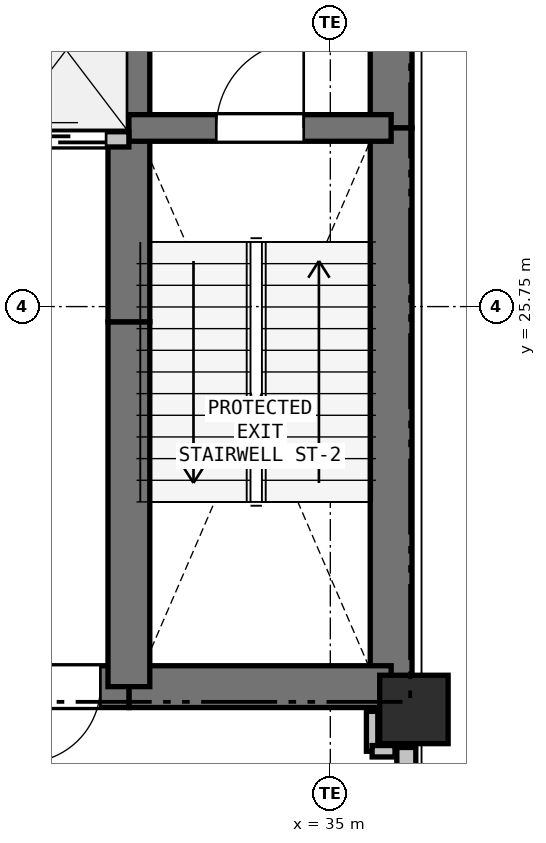
"""IFC4 building model, lengths in metres.
Left out: names, types, materials, properties, quantities, classifications, styles, units other than length and angle.
Written with IfcOpenShell. Run it as: python <this file> out.ifc"""

import sys

from ifc_helpers import new_model, si_unit, direction, frame, frame_2d, origin, origin_2d, place, context, subcontext, project, spatial, rectangle, extrude, element, fill, save


model = new_model("IFC4")
c1 = context("Model", 3, precision=1e-05, world=origin(), true_north=direction((0.0, 1.0)))
c2 = subcontext(c1, "Body", "Model", "MODEL_VIEW")
j1 = project(units=[si_unit("LENGTHUNIT", "METRE"), si_unit("PLANEANGLEUNIT", "RADIAN")], contexts=[c1])
p1 = place(None, origin())
s1 = spatial("IfcSite", under=j1, at=p1, CompositionType="ELEMENT")
p2 = place(p1, origin())
s2 = spatial("IfcBuilding", under=s1, at=p2, CompositionType="ELEMENT")
p3 = place(p2, frame((0.0, 0.0, 5.1)))
s3 = spatial("IfcBuildingStorey", under=s2, at=p3, CompositionType="ELEMENT", Elevation=5.1)
p4 = place(p3, frame((36.1, 20.45, 0.0), z_axis=(0.0, 0.0, 1.0), x_axis=(1.0, 0.0, 0.0)))
e1 = element("IfcColumn", 1, at=p4, inside=s3, PredefinedType="COLUMN", context=c2, shape_type="SweptSolid", body=[
    extrude(rectangle(XDim=0.9, YDim=0.9, at=origin_2d()), origin(), (0.0, 0.0, 1.0), 4.5),
])
p5 = place(p3, frame((36.0, 19.95, 0.0), z_axis=(0.0, 0.0, 1.0), x_axis=(0.0, -1.0, 0.0)))
e2 = element("IfcWall", 2, at=p5, inside=s3, PredefinedType="SOLIDWALL", context=c2, shape_type="SweptSolid", body=[
    extrude(rectangle(XDim=1.55, YDim=0.25, at=frame_2d((0.775, 0.0))), origin(), (0.0, 0.0, 1.0), 2.815),
])
p6 = place(p3, frame((35.8, 32.75, 0.0), z_axis=(0.0, 0.0, 1.0), x_axis=(0.0, -1.0, 0.0)))
e3 = element("IfcWall", 3, at=p6, inside=s3, PredefinedType="SHEAR", context=c2, shape_type="SweptSolid", body=[
    extrude(rectangle(XDim=4.65, YDim=0.55, at=frame_2d((2.325, 0.0))), origin(), (0.0, 0.0, 1.0), 4.18),
])
p7 = place(p3, frame((35.8, 28.1, 0.0), z_axis=(0.0, 0.0, 1.0), x_axis=(0.0, -1.0, 0.0)))
e4 = element("IfcWall", 4, at=p7, inside=s3, PredefinedType="SHEAR", context=c2, shape_type="SweptSolid", body=[
    extrude(rectangle(XDim=7.35, YDim=0.55, at=frame_2d((3.675, 0.0))), origin(), (0.0, 0.0, 1.0), 4.18),
])
p8 = place(p3, frame((35.8, 20.75, 0.0), z_axis=(0.0, 0.0, 1.0), x_axis=(-1.0, 0.0, 0.0)))
e5 = element("IfcWall", 5, at=p8, inside=s3, PredefinedType="SHEAR", context=c2, shape_type="SweptSolid", body=[
    extrude(rectangle(XDim=3.45, YDim=0.55, at=frame_2d((1.725, 0.0))), origin(), (0.0, 0.0, 1.0), 4.18),
])
p9 = place(p3, frame((32.35, 20.75, 0.0), z_axis=(0.0, 0.0, 1.0), x_axis=(-1.0, 0.0, 0.0)))
e6 = element("IfcWall", 6, at=p9, inside=s3, PredefinedType="SHEAR", context=c2, shape_type="SweptSolid", body=[
    extrude(rectangle(XDim=1.75, YDim=0.55, at=frame_2d((0.875, 0.0))), origin(), (0.0, 0.0, 1.0), 4.18),
])
p10 = place(p9, frame((0.375, 0.0, 0.0)))
e7 = element("IfcOpeningElement", 7, at=p10, cuts=e6, PredefinedType="OPENING", context=c2, shape_type="SweptSolid", body=[
    extrude(rectangle(XDim=1.0, YDim=2.15, at=frame_2d((0.5, 1.075))), frame((0.0, 0.285, 0.0), z_axis=(0.0, -1.0, 0.0), x_axis=(1.0, 0.0, 0.0)), (0.0, 0.0, 1.0), 0.57),
])
p11 = place(p3, frame((32.35, 20.75, 0.0), z_axis=(0.0, 0.0, 1.0), x_axis=(0.0, 1.0, 0.0)))
e8 = element("IfcWall", 8, at=p11, inside=s3, PredefinedType="SHEAR", context=c2, shape_type="SweptSolid", body=[
    extrude(rectangle(XDim=4.8, YDim=0.55, at=frame_2d((2.4, 0.0))), origin(), (0.0, 0.0, 1.0), 4.18),
])
p12 = place(p3, frame((32.35, 25.55, 0.0), z_axis=(0.0, 0.0, 1.0), x_axis=(0.0, 1.0, 0.0)))
e9 = element("IfcWall", 9, at=p12, inside=s3, PredefinedType="SHEAR", context=c2, shape_type="SweptSolid", body=[
    extrude(rectangle(XDim=2.4, YDim=0.55, at=frame_2d((1.2, 0.0))), origin(), (0.0, 0.0, 1.0), 4.18),
])
p13 = place(p3, frame((32.35, 27.95, 0.0), z_axis=(0.0, 0.0, 1.0), x_axis=(0.0, 1.0, 0.0)))
e10 = element("IfcWall", 10, at=p13, inside=s3, PredefinedType="SHEAR", context=c2, shape_type="SweptSolid", body=[
    extrude(rectangle(XDim=2.8, YDim=0.55, at=frame_2d((1.4, 0.0))), origin(), (0.0, 0.0, 1.0), 4.18),
])
p14 = place(p3, frame((32.35, 28.1, 0.0), z_axis=(0.0, 0.0, 1.0), x_axis=(1.0, 0.0, 0.0)))
e11 = element("IfcWall", 11, at=p14, inside=s3, PredefinedType="SHEAR", context=c2, shape_type="SweptSolid", body=[
    extrude(rectangle(XDim=3.45, YDim=0.35, at=frame_2d((1.725, 0.0))), origin(), (0.0, 0.0, 1.0), 4.18),
])
p15 = place(p14, frame((1.15, 0.0, 0.0)))
e12 = element("IfcOpeningElement", 12, at=p15, cuts=e11, PredefinedType="OPENING", context=c2, shape_type="SweptSolid", body=[
    extrude(rectangle(XDim=1.15, YDim=2.15, at=frame_2d((0.575, 1.075))), frame((0.0, 0.185, 0.0), z_axis=(0.0, -1.0, 0.0), x_axis=(1.0, 0.0, 0.0)), (0.0, 0.0, 1.0), 0.37),
])
p16 = place(p3, frame((27.4, 27.95, 0.0), z_axis=(0.0, 0.0, 1.0), x_axis=(1.0, 0.0, 0.0)))
e13 = element("IfcWall", 13, at=p16, inside=s3, PredefinedType="PARTITIONING", context=c2, shape_type="SweptSolid", body=[
    extrude(rectangle(XDim=4.95, YDim=0.2, at=frame_2d((2.475, 0.0))), origin(), (0.0, 0.0, 1.0), 4.18),
])
p17 = place(p16, frame((0.25, 0.0, 0.0)))
e14 = element("IfcOpeningElement", 14, at=p17, cuts=e13, PredefinedType="OPENING", context=c2, shape_type="SweptSolid", body=[
    extrude(rectangle(XDim=1.1, YDim=2.15, at=frame_2d((0.55, 1.075))), frame((0.0, 0.11, 0.0), z_axis=(0.0, -1.0, 0.0), x_axis=(1.0, 0.0, 0.0)), (0.0, 0.0, 1.0), 0.22),
])
p18 = place(p16, frame((1.9, 0.0, 0.0)))
e15 = element("IfcOpeningElement", 15, at=p18, cuts=e13, PredefinedType="OPENING", context=c2, shape_type="SweptSolid", body=[
    extrude(rectangle(XDim=1.1, YDim=2.15, at=frame_2d((0.55, 1.075))), frame((0.0, 0.11, 0.0), z_axis=(0.0, -1.0, 0.0), x_axis=(1.0, 0.0, 0.0)), (0.0, 0.0, 1.0), 0.22),
])
p19 = place(p16, frame((3.55, 0.0, 0.0)))
e16 = element("IfcOpeningElement", 16, at=p19, cuts=e13, PredefinedType="OPENING", context=c2, shape_type="SweptSolid", body=[
    extrude(rectangle(XDim=1.1, YDim=2.15, at=frame_2d((0.55, 1.075))), frame((0.0, 0.11, 0.0), z_axis=(0.0, -1.0, 0.0), x_axis=(1.0, 0.0, 0.0)), (0.0, 0.0, 1.0), 0.22),
])
p20 = place(p3, frame((35.55, 20.425, 0.0), z_axis=(0.0, 0.0, 1.0), x_axis=(0.0, -1.0, 0.0)))
e17 = element("IfcWall", 17, at=p20, inside=s3, PredefinedType="PARTITIONING", context=c2, shape_type="SweptSolid", body=[
    extrude(rectangle(XDim=0.525, YDim=0.15, at=frame_2d((0.263, 0.0))), origin(), (0.0, 0.0, 1.0), 3.628),
])
p21 = place(p3, frame((35.55, 19.9, 0.0), z_axis=(0.0, 0.0, 1.0), x_axis=(1.0, 0.0, 0.0)))
e18 = element("IfcWall", 18, at=p21, inside=s3, PredefinedType="PARTITIONING", context=c2, shape_type="SweptSolid", body=[
    extrude(rectangle(XDim=0.301, YDim=0.15, at=frame_2d((0.15, 0.0))), origin(), (0.0, 0.0, 1.0), 4.18),
])
p22 = place(p19, origin())
e19 = element("IfcDoor", 19, at=p22, inside=s3, OperationType="SLIDING_TO_LEFT", PredefinedType="DOOR", context=c2, shape_type="SweptSolid", body=[
    extrude(rectangle(XDim=1.1, YDim=2.15, at=frame_2d((0.55, 1.075))), frame((0.0, 0.025, 0.0), z_axis=(0.0, -1.0, 0.0), x_axis=(1.0, 0.0, 0.0)), (0.0, 0.0, 1.0), 0.05),
])
fill(e16, e19)
p23 = place(p10, origin())
e20 = element("IfcDoor", 20, at=p23, inside=s3, OperationType="SINGLE_SWING_RIGHT", PredefinedType="DOOR", context=c2, shape_type="SweptSolid", body=[
    extrude(rectangle(XDim=1.0, YDim=2.15, at=frame_2d((0.5, 1.075))), frame((0.0, 0.025, 0.0), z_axis=(0.0, -1.0, 0.0), x_axis=(1.0, 0.0, 0.0)), (0.0, 0.0, 1.0), 0.05),
])
fill(e7, e20)
p24 = place(p15, origin())
e21 = element("IfcDoor", 21, at=p24, inside=s3, OperationType="SINGLE_SWING_RIGHT", PredefinedType="DOOR", context=c2, shape_type="SweptSolid", body=[
    extrude(rectangle(XDim=1.15, YDim=2.15, at=frame_2d((0.575, 1.075))), frame((0.0, 0.025, 0.0), z_axis=(0.0, -1.0, 0.0), x_axis=(1.0, 0.0, 0.0)), (0.0, 0.0, 1.0), 0.05),
])
fill(e12, e21)
save(model, sys.argv[1])
